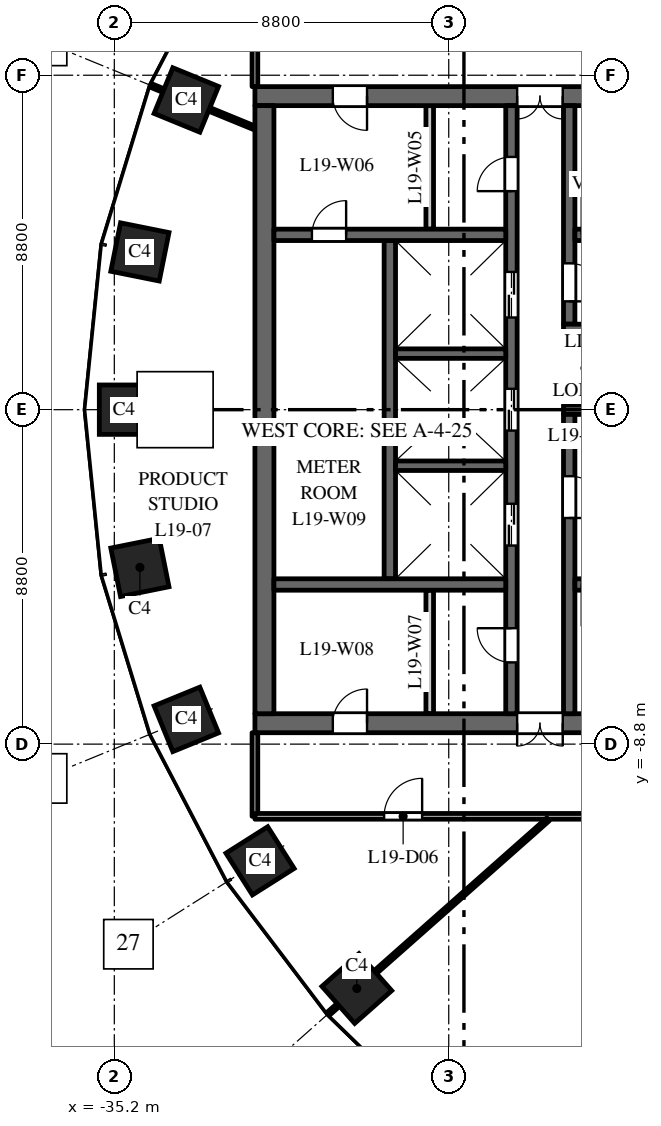
"""IFC4 building model, lengths in metres.
Left out: names, types, materials, properties, quantities, classifications, styles, units other than length and angle.
Written with IfcOpenShell. Run it as: python <this file> out.ifc"""

import sys

from ifc_helpers import new_model, si_unit, direction, frame, frame_2d, origin, origin_2d, place, context, subcontext, project, spatial, rectangle, extrude, element, fill, save


model = new_model("IFC4")
c1 = context("Model", 3, precision=1e-05, world=origin(), true_north=direction((0.0, 1.0)))
c2 = subcontext(c1, "Body", "Model", "MODEL_VIEW")
j1 = project(units=[si_unit("LENGTHUNIT", "METRE"), si_unit("PLANEANGLEUNIT", "RADIAN")], contexts=[c1])
p1 = place(None, origin())
s1 = spatial("IfcSite", under=j1, at=p1, CompositionType="ELEMENT")
p2 = place(p1, origin())
s2 = spatial("IfcBuilding", under=s1, at=p2, CompositionType="ELEMENT")
p3 = place(p2, frame((0.0, 0.0, 88.0)))
s3 = spatial("IfcBuildingStorey", under=s2, at=p3, CompositionType="ELEMENT", Elevation=88.0)
for number, where, z_axis, x_axis in (
    (1, (-33.305, 8.149, 0.0), (0.0, 0.0, 1.0), (-0.379, -0.925, 0.0)),
    (2, (-34.527, 4.151, 0.0), (0.0, 0.0, 1.0), (-0.197, -0.98, 0.0)),
    (3, (-34.945, 0.0, 0.0), (0.0, 0.0, 1.0), (0.0, -1.0, 0.0)),
    (4, (-34.527, -4.151, 0.0), (0.0, 0.0, 1.0), (0.197, -0.98, 0.0)),
    (5, (-33.305, -8.149, 0.0), (0.0, 0.0, 1.0), (0.379, -0.925, 0.0)),
    (6, (-31.365, -11.871, 0.0), (0.0, 0.0, 1.0), (0.535, -0.845, 0.0)),
    (7, (-28.819, -15.23, 0.0), (0.0, 0.0, 1.0), (0.663, -0.749, 0.0)),
):
    element("IfcColumn", number, at=place(p3, frame(where, z_axis=z_axis, x_axis=x_axis)), inside=s3, PredefinedType="COLUMN", context=c2, shape_type="SweptSolid", body=[
        extrude(rectangle(XDim=1.3, YDim=1.3, at=origin_2d()), origin(), (0.0, 0.0, 1.0), 4.0),
    ])
p4 = place(p3, frame((-16.5, 8.25, 0.0), z_axis=(0.0, 0.0, 1.0), x_axis=(-1.0, 0.0, 0.0)))
e8 = element("IfcWall", 8, at=p4, inside=s3, PredefinedType="SHEAR", context=c2, shape_type="SweptSolid", body=[
    extrude(rectangle(XDim=15.0, YDim=0.5, at=frame_2d((7.5, 0.0))), origin(), (0.0, 0.0, 1.0), 3.7),
])
p5 = place(p4, frame((6.9, 0.0, 0.0)))
e9 = element("IfcOpeningElement", 9, at=p5, cuts=e8, PredefinedType="OPENING", context=c2, shape_type="SweptSolid", body=[
    extrude(rectangle(XDim=1.2, YDim=2.1, at=frame_2d((0.6, 1.05))), frame((0.0, 0.26, 0.0), z_axis=(0.0, -1.0, 0.0), x_axis=(1.0, 0.0, 0.0)), (0.0, 0.0, 1.0), 0.52),
])
p6 = place(p4, frame((12.05, 0.0, 0.0)))
e10 = element("IfcOpeningElement", 10, at=p6, cuts=e8, PredefinedType="OPENING", context=c2, shape_type="SweptSolid", body=[
    extrude(rectangle(XDim=0.9, YDim=2.1, at=frame_2d((0.45, 1.05))), frame((0.0, 0.26, 0.0), z_axis=(0.0, -1.0, 0.0), x_axis=(1.0, 0.0, 0.0)), (0.0, 0.0, 1.0), 0.52),
])
p7 = place(p3, frame((-16.5, -8.25, 0.0), z_axis=(0.0, 0.0, 1.0), x_axis=(-1.0, 0.0, 0.0)))
e11 = element("IfcWall", 11, at=p7, inside=s3, PredefinedType="SHEAR", context=c2, shape_type="SweptSolid", body=[
    extrude(rectangle(XDim=15.0, YDim=0.5, at=frame_2d((7.5, 0.0))), origin(), (0.0, 0.0, 1.0), 3.7),
])
p8 = place(p7, frame((6.9, 0.0, 0.0)))
e12 = element("IfcOpeningElement", 12, at=p8, cuts=e11, PredefinedType="OPENING", context=c2, shape_type="SweptSolid", body=[
    extrude(rectangle(XDim=1.2, YDim=2.1, at=frame_2d((0.6, 1.05))), frame((0.0, 0.26, 0.0), z_axis=(0.0, -1.0, 0.0), x_axis=(1.0, 0.0, 0.0)), (0.0, 0.0, 1.0), 0.52),
])
p9 = place(p7, frame((12.05, 0.0, 0.0)))
e13 = element("IfcOpeningElement", 13, at=p9, cuts=e11, PredefinedType="OPENING", context=c2, shape_type="SweptSolid", body=[
    extrude(rectangle(XDim=0.9, YDim=2.1, at=frame_2d((0.45, 1.05))), frame((0.0, 0.26, 0.0), z_axis=(0.0, -1.0, 0.0), x_axis=(1.0, 0.0, 0.0)), (0.0, 0.0, 1.0), 0.52),
])
p10 = place(p3, frame((-27.95, -4.45, 0.0), z_axis=(0.0, 0.0, 1.0), x_axis=(0.0, 1.0, 0.0)))
e14 = element("IfcWall", 14, at=p10, inside=s3, PredefinedType="SHEAR", context=c2, shape_type="SweptSolid", body=[
    extrude(rectangle(XDim=8.9, YDim=0.3, at=frame_2d((4.45, 0.0))), origin(), (0.0, 0.0, 1.0), 3.7),
])
p11 = place(p3, frame((-24.75, -8.0, 0.0), z_axis=(0.0, 0.0, 1.0), x_axis=(0.0, 1.0, 0.0)))
e15 = element("IfcWall", 15, at=p11, inside=s3, PredefinedType="SHEAR", context=c2, shape_type="SweptSolid", body=[
    extrude(rectangle(XDim=16.0, YDim=0.3, at=frame_2d((8.0, 0.0))), origin(), (0.0, 0.0, 1.0), 3.7),
])
p12 = place(p11, frame((4.425, 0.0, 0.0)))
e16 = element("IfcOpeningElement", 16, at=p12, cuts=e15, PredefinedType="OPENING", context=c2, shape_type="SweptSolid", body=[
    extrude(rectangle(XDim=1.1, YDim=2.1, at=frame_2d((0.55, 1.05))), frame((0.0, 0.16, 0.0), z_axis=(0.0, -1.0, 0.0), x_axis=(1.0, 0.0, 0.0)), (0.0, 0.0, 1.0), 0.32),
])
p13 = place(p11, frame((7.45, 0.0, 0.0)))
e17 = element("IfcOpeningElement", 17, at=p13, cuts=e15, PredefinedType="OPENING", context=c2, shape_type="SweptSolid", body=[
    extrude(rectangle(XDim=1.1, YDim=2.1, at=frame_2d((0.55, 1.05))), frame((0.0, 0.16, 0.0), z_axis=(0.0, -1.0, 0.0), x_axis=(1.0, 0.0, 0.0)), (0.0, 0.0, 1.0), 0.32),
])
p14 = place(p11, frame((10.425, 0.0, 0.0)))
e18 = element("IfcOpeningElement", 18, at=p14, cuts=e15, PredefinedType="OPENING", context=c2, shape_type="SweptSolid", body=[
    extrude(rectangle(XDim=1.2, YDim=2.1, at=frame_2d((0.6, 1.05))), frame((0.0, 0.16, 0.0), z_axis=(0.0, -1.0, 0.0), x_axis=(1.0, 0.0, 0.0)), (0.0, 0.0, 1.0), 0.32),
])
p15 = place(p11, frame((13.75, 0.0, 0.0)))
e19 = element("IfcOpeningElement", 19, at=p15, cuts=e15, PredefinedType="OPENING", context=c2, shape_type="SweptSolid", body=[
    extrude(rectangle(XDim=0.9, YDim=2.1, at=frame_2d((0.45, 1.05))), frame((0.0, 0.16, 0.0), z_axis=(0.0, -1.0, 0.0), x_axis=(1.0, 0.0, 0.0)), (0.0, 0.0, 1.0), 0.32),
])
p16 = place(p11, frame((1.35, 0.0, 0.0)))
e20 = element("IfcOpeningElement", 20, at=p16, cuts=e15, PredefinedType="OPENING", context=c2, shape_type="SweptSolid", body=[
    extrude(rectangle(XDim=0.9, YDim=2.1, at=frame_2d((0.45, 1.05))), frame((0.0, 0.16, 0.0), z_axis=(0.0, -1.0, 0.0), x_axis=(1.0, 0.0, 0.0)), (0.0, 0.0, 1.0), 0.32),
])
p17 = place(p3, frame((-20.1, 0.0, 0.0), z_axis=(0.0, 0.0, 1.0), x_axis=(-1.0, 0.0, 0.0)))
e21 = element("IfcWall", 21, at=p17, inside=s3, PredefinedType="SHEAR", context=c2, shape_type="SweptSolid", body=[
    extrude(rectangle(XDim=3.28, YDim=0.25, at=frame_2d((1.64, 0.0))), origin(), (0.0, 0.0, 1.0), 3.7),
])
p18 = place(p3, frame((-31.25, -8.0, 0.0), z_axis=(0.0, 0.0, 1.0), x_axis=(0.0, 1.0, 0.0)))
e22 = element("IfcWall", 22, at=p18, inside=s3, PredefinedType="SHEAR", context=c2, shape_type="SweptSolid", body=[
    extrude(rectangle(XDim=16.0, YDim=0.5, at=frame_2d((8.0, 0.0))), origin(), (0.0, 0.0, 1.0), 3.7),
])
p19 = place(p3, frame((-24.9, 4.6, 0.0), z_axis=(0.0, 0.0, 1.0), x_axis=(-1.0, 0.0, 0.0)))
e23 = element("IfcWall", 23, at=p19, inside=s3, PredefinedType="SHEAR", context=c2, shape_type="SweptSolid", body=[
    extrude(rectangle(XDim=6.1, YDim=0.3, at=frame_2d((3.05, 0.0))), origin(), (0.0, 0.0, 1.0), 3.7),
])
p20 = place(p19, frame((4.2, 0.0, 0.0)))
e24 = element("IfcOpeningElement", 24, at=p20, cuts=e23, PredefinedType="OPENING", context=c2, shape_type="SweptSolid", body=[
    extrude(rectangle(XDim=0.9, YDim=2.1, at=frame_2d((0.45, 1.05))), frame((0.0, 0.16, 0.0), z_axis=(0.0, -1.0, 0.0), x_axis=(1.0, 0.0, 0.0)), (0.0, 0.0, 1.0), 0.32),
])
for number, where, z_axis, x_axis in (
    (25, (-26.9, 4.75, 0.0), (0.0, 0.0, 1.0), (0.0, 1.0, 0.0)),
    (26, (-26.9, -8.0, 0.0), (0.0, 0.0, 1.0), (0.0, 1.0, 0.0)),
):
    element("IfcWall", number, at=place(p3, frame(where, z_axis=z_axis, x_axis=x_axis)), inside=s3, PredefinedType="PARTITIONING", context=c2, shape_type="SweptSolid", body=[
        extrude(rectangle(XDim=3.25, YDim=0.2, at=frame_2d((1.625, 0.0))), origin(), (0.0, 0.0, 1.0), 3.7),
    ])
p21 = place(p3, frame((-24.9, -4.6, 0.0), z_axis=(0.0, 0.0, 1.0), x_axis=(-1.0, 0.0, 0.0)))
e27 = element("IfcWall", 27, at=p21, inside=s3, PredefinedType="SHEAR", context=c2, shape_type="SweptSolid", body=[
    extrude(rectangle(XDim=6.1, YDim=0.3, at=frame_2d((3.05, 0.0))), origin(), (0.0, 0.0, 1.0), 3.7),
])
for number, where, z_axis, x_axis in (
    (28, (-24.9, -1.475, 0.0), (0.0, 0.0, 1.0), (-1.0, 0.0, 0.0)),
    (29, (-24.9, 1.475, 0.0), (0.0, 0.0, 1.0), (-1.0, 0.0, 0.0)),
):
    element("IfcWall", number, at=place(p3, frame(where, z_axis=z_axis, x_axis=x_axis)), inside=s3, PredefinedType="SHEAR", context=c2, shape_type="SweptSolid", body=[
        extrude(rectangle(XDim=2.9, YDim=0.25, at=frame_2d((1.45, 0.0))), origin(), (0.0, 0.0, 1.0), 3.7),
    ])
p22 = place(p3, frame((-23.23, 2.25, 0.0), z_axis=(0.0, 0.0, 1.0), x_axis=(0.0, 1.0, 0.0)))
e30 = element("IfcWall", 30, at=p22, inside=s3, PredefinedType="SHEAR", context=c2, shape_type="SweptSolid", body=[
    extrude(rectangle(XDim=5.75, YDim=0.3, at=frame_2d((2.875, 0.0))), origin(), (0.0, 0.0, 1.0), 3.7),
])
p23 = place(p22, frame((0.6, 0.0, 0.0)))
e31 = element("IfcOpeningElement", 31, at=p23, cuts=e30, PredefinedType="OPENING", context=c2, shape_type="SweptSolid", body=[
    extrude(rectangle(XDim=1.0, YDim=2.1, at=frame_2d((0.5, 1.05))), frame((0.0, 0.16, 0.0), z_axis=(0.0, -1.0, 0.0), x_axis=(1.0, 0.0, 0.0)), (0.0, 0.0, 1.0), 0.32),
])
p24 = place(p3, frame((-23.23, -8.0, 0.0), z_axis=(0.0, 0.0, 1.0), x_axis=(0.0, 1.0, 0.0)))
e32 = element("IfcWall", 32, at=p24, inside=s3, PredefinedType="SHEAR", context=c2, shape_type="SweptSolid", body=[
    extrude(rectangle(XDim=7.875, YDim=0.3, at=frame_2d((3.938, 0.0))), origin(), (0.0, 0.0, 1.0), 3.7),
])
p25 = place(p24, frame((5.15, 0.0, 0.0)))
e33 = element("IfcOpeningElement", 33, at=p25, cuts=e32, PredefinedType="OPENING", context=c2, shape_type="SweptSolid", body=[
    extrude(rectangle(XDim=1.1, YDim=2.1, at=frame_2d((0.55, 1.05))), frame((0.0, 0.16, 0.0), z_axis=(0.0, -1.0, 0.0), x_axis=(1.0, 0.0, 0.0)), (0.0, 0.0, 1.0), 0.32),
])
p26 = place(p3, frame((-16.9, 4.6, 0.0), z_axis=(0.0, 0.0, 1.0), x_axis=(-1.0, 0.0, 0.0)))
e34 = element("IfcWall", 34, at=p26, inside=s3, PredefinedType="SHEAR", context=c2, shape_type="SweptSolid", body=[
    extrude(rectangle(XDim=6.18, YDim=0.3, at=frame_2d((3.09, 0.0))), origin(), (0.0, 0.0, 1.0), 3.7),
])
p27 = place(p26, frame((4.9, 0.0, 0.0)))
e35 = element("IfcOpeningElement", 35, at=p27, cuts=e34, PredefinedType="OPENING", context=c2, shape_type="SweptSolid", body=[
    extrude(rectangle(XDim=1.1, YDim=2.1, at=frame_2d((0.55, 1.05))), frame((0.0, 0.16, 0.0), z_axis=(0.0, -1.0, 0.0), x_axis=(1.0, 0.0, 0.0)), (0.0, 0.0, 1.0), 0.32),
])
p28 = place(p3, frame((-16.9, -4.6, 0.0), z_axis=(0.0, 0.0, 1.0), x_axis=(-1.0, 0.0, 0.0)))
e36 = element("IfcWall", 36, at=p28, inside=s3, PredefinedType="SHEAR", context=c2, shape_type="SweptSolid", body=[
    extrude(rectangle(XDim=6.18, YDim=0.3, at=frame_2d((3.09, 0.0))), origin(), (0.0, 0.0, 1.0), 3.7),
])
p29 = place(p28, frame((4.9, 0.0, 0.0)))
e37 = element("IfcOpeningElement", 37, at=p29, cuts=e36, PredefinedType="OPENING", context=c2, shape_type="SweptSolid", body=[
    extrude(rectangle(XDim=1.1, YDim=2.1, at=frame_2d((0.55, 1.05))), frame((0.0, 0.16, 0.0), z_axis=(0.0, -1.0, 0.0), x_axis=(1.0, 0.0, 0.0)), (0.0, 0.0, 1.0), 0.32),
])
p30 = place(p3, frame((-20.85, 2.125, 0.0), z_axis=(0.0, 0.0, 1.0), x_axis=(-1.0, 0.0, 0.0)))
e38 = element("IfcWall", 38, at=p30, inside=s3, PredefinedType="SHEAR", context=c2, shape_type="SweptSolid", body=[
    extrude(rectangle(XDim=2.53, YDim=0.25, at=frame_2d((1.265, 0.0))), origin(), (0.0, 0.0, 1.0), 3.7),
])
p31 = place(p3, frame((-34.234, 8.53, 0.0), z_axis=(0.0, 0.0, 1.0), x_axis=(0.925344112436, -0.379128307542, 0.0)))
e39 = element("IfcWall", 39, at=p31, inside=s3, PredefinedType="PARTITIONING", context=c2, shape_type="SweptSolid", body=[
    extrude(rectangle(XDim=2.954, YDim=0.1, at=frame_2d((1.477, 0.0))), origin(), (0.0, 0.0, 1.0), 2.9),
])
p32 = place(p3, frame((-31.5, -10.7, 0.0), z_axis=(0.0, 0.0, 1.0), x_axis=(0.0, 1.0, 0.0)))
e40 = element("IfcWall", 40, at=p32, inside=s3, PredefinedType="PARTITIONING", context=c2, shape_type="SweptSolid", body=[
    extrude(rectangle(XDim=2.2, YDim=0.15, at=frame_2d((1.1, 0.0))), origin(), (0.0, 0.0, 1.0), 3.7),
])
p33 = place(p3, frame((-31.5, -10.7, 0.0), z_axis=(0.0, 0.0, 1.0), x_axis=(1.0, 0.0, 0.0)))
e41 = element("IfcWall", 41, at=p33, inside=s3, PredefinedType="PARTITIONING", context=c2, shape_type="SweptSolid", body=[
    extrude(rectangle(XDim=15.0, YDim=0.15, at=frame_2d((7.5, 0.0))), origin(), (0.0, 0.0, 1.0), 3.1),
])
p34 = place(p33, frame((3.4, 0.0, 0.0)))
e42 = element("IfcOpeningElement", 42, at=p34, cuts=e41, PredefinedType="OPENING", context=c2, shape_type="SweptSolid", body=[
    extrude(rectangle(XDim=1.0, YDim=2.1, at=frame_2d((0.5, 1.05))), frame((0.0, 0.085, 0.0), z_axis=(0.0, -1.0, 0.0), x_axis=(1.0, 0.0, 0.0)), (0.0, 0.0, 1.0), 0.17),
])
p35 = place(p33, frame((10.948, 0.0, 0.0)))
e43 = element("IfcOpeningElement", 43, at=p35, cuts=e41, PredefinedType="OPENING", context=c2, shape_type="SweptSolid", body=[
    extrude(rectangle(XDim=1.0, YDim=2.1, at=frame_2d((0.5, 1.05))), frame((0.0, 0.085, 0.0), z_axis=(0.0, -1.0, 0.0), x_axis=(1.0, 0.0, 0.0)), (0.0, 0.0, 1.0), 0.17),
])
p36 = place(p3, frame((-31.5, 8.5, 0.0), z_axis=(0.0, 0.0, 1.0), x_axis=(0.0, 1.0, 0.0)))
e44 = element("IfcWall", 44, at=p36, inside=s3, PredefinedType="PARTITIONING", context=c2, shape_type="SweptSolid", body=[
    extrude(rectangle(XDim=2.2, YDim=0.15, at=frame_2d((1.1, 0.0))), origin(), (0.0, 0.0, 1.0), 3.7),
])
p37 = place(p3, frame((-29.569, -15.895, 0.0), z_axis=(0.0, 0.0, 1.0), x_axis=(0.748985701008, 0.662586160198, 0.0)))
e45 = element("IfcWall", 45, at=p37, inside=s3, PredefinedType="PARTITIONING", context=c2, shape_type="SweptSolid", body=[
    extrude(rectangle(XDim=7.723, YDim=0.1, at=frame_2d((3.861, 0.0))), origin(), (0.0, 0.0, 1.0), 2.9),
])
p38 = place(p12, origin())
e46 = element("IfcDoor", 46, at=p38, inside=s3, OperationType="DOUBLE_DOOR_SLIDING", PredefinedType="DOOR", context=c2, shape_type="SweptSolid", body=[
    extrude(rectangle(XDim=1.1, YDim=2.1, at=frame_2d((0.55, 1.05))), frame((0.0, 0.025, 0.0), z_axis=(0.0, -1.0, 0.0), x_axis=(1.0, 0.0, 0.0)), (0.0, 0.0, 1.0), 0.05),
])
fill(e16, e46)
p39 = place(p13, origin())
e47 = element("IfcDoor", 47, at=p39, inside=s3, OperationType="DOUBLE_DOOR_SLIDING", PredefinedType="DOOR", context=c2, shape_type="SweptSolid", body=[
    extrude(rectangle(XDim=1.1, YDim=2.1, at=frame_2d((0.55, 1.05))), frame((0.0, 0.025, 0.0), z_axis=(0.0, -1.0, 0.0), x_axis=(1.0, 0.0, 0.0)), (0.0, 0.0, 1.0), 0.05),
])
fill(e17, e47)
p40 = place(p14, origin())
e48 = element("IfcDoor", 48, at=p40, inside=s3, OperationType="DOUBLE_DOOR_SLIDING", PredefinedType="DOOR", context=c2, shape_type="SweptSolid", body=[
    extrude(rectangle(XDim=1.2, YDim=2.1, at=frame_2d((0.6, 1.05))), frame((0.0, 0.025, 0.0), z_axis=(0.0, -1.0, 0.0), x_axis=(1.0, 0.0, 0.0)), (0.0, 0.0, 1.0), 0.05),
])
fill(e18, e48)
p41 = place(p27, origin())
e49 = element("IfcDoor", 49, at=p41, inside=s3, OperationType="SINGLE_SWING_RIGHT", PredefinedType="DOOR", context=c2, shape_type="SweptSolid", body=[
    extrude(rectangle(XDim=1.1, YDim=2.1, at=frame_2d((0.55, 1.05))), frame((0.0, 0.025, 0.0), z_axis=(0.0, -1.0, 0.0), x_axis=(1.0, 0.0, 0.0)), (0.0, 0.0, 1.0), 0.05),
])
fill(e35, e49)
p42 = place(p29, origin())
e50 = element("IfcDoor", 50, at=p42, inside=s3, OperationType="SINGLE_SWING_LEFT", PredefinedType="DOOR", context=c2, shape_type="SweptSolid", body=[
    extrude(rectangle(XDim=1.1, YDim=2.1, at=frame_2d((0.55, 1.05))), frame((0.0, 0.025, 0.0), z_axis=(0.0, -1.0, 0.0), x_axis=(1.0, 0.0, 0.0)), (0.0, 0.0, 1.0), 0.05),
])
fill(e37, e50)
p43 = place(p25, origin())
e51 = element("IfcDoor", 51, at=p43, inside=s3, OperationType="SINGLE_SWING_LEFT", PredefinedType="DOOR", context=c2, shape_type="SweptSolid", body=[
    extrude(rectangle(XDim=1.1, YDim=2.1, at=frame_2d((0.55, 1.05))), frame((0.0, 0.025, 0.0), z_axis=(0.0, -1.0, 0.0), x_axis=(1.0, 0.0, 0.0)), (0.0, 0.0, 1.0), 0.05),
])
fill(e33, e51)
p44 = place(p23, origin())
e52 = element("IfcDoor", 52, at=p44, inside=s3, OperationType="SINGLE_SWING_LEFT", PredefinedType="DOOR", context=c2, shape_type="SweptSolid", body=[
    extrude(rectangle(XDim=1.0, YDim=2.1, at=frame_2d((0.5, 1.05))), frame((0.0, 0.025, 0.0), z_axis=(0.0, -1.0, 0.0), x_axis=(1.0, 0.0, 0.0)), (0.0, 0.0, 1.0), 0.05),
])
fill(e31, e52)
p45 = place(p5, origin())
e53 = element("IfcDoor", 53, at=p45, inside=s3, OperationType="DOUBLE_DOOR_DOUBLE_SWING", PredefinedType="DOOR", context=c2, shape_type="SweptSolid", body=[
    extrude(rectangle(XDim=1.2, YDim=2.1, at=frame_2d((0.6, 1.05))), frame((0.0, 0.025, 0.0), z_axis=(0.0, -1.0, 0.0), x_axis=(1.0, 0.0, 0.0)), (0.0, 0.0, 1.0), 0.05),
])
fill(e9, e53)
p46 = place(p8, origin())
e54 = element("IfcDoor", 54, at=p46, inside=s3, OperationType="DOUBLE_DOOR_DOUBLE_SWING", PredefinedType="DOOR", context=c2, shape_type="SweptSolid", body=[
    extrude(rectangle(XDim=1.2, YDim=2.1, at=frame_2d((0.6, 1.05))), frame((0.0, 0.025, 0.0), z_axis=(0.0, -1.0, 0.0), x_axis=(1.0, 0.0, 0.0)), (0.0, 0.0, 1.0), 0.05),
])
fill(e12, e54)
p47 = place(p15, origin())
e55 = element("IfcDoor", 55, at=p47, inside=s3, OperationType="SINGLE_SWING_RIGHT", PredefinedType="DOOR", context=c2, shape_type="SweptSolid", body=[
    extrude(rectangle(XDim=0.9, YDim=2.1, at=frame_2d((0.45, 1.05))), frame((0.0, 0.025, 0.0), z_axis=(0.0, -1.0, 0.0), x_axis=(1.0, 0.0, 0.0)), (0.0, 0.0, 1.0), 0.05),
])
fill(e19, e55)
p48 = place(p6, origin())
e56 = element("IfcDoor", 56, at=p48, inside=s3, OperationType="SINGLE_SWING_RIGHT", PredefinedType="DOOR", context=c2, shape_type="SweptSolid", body=[
    extrude(rectangle(XDim=0.9, YDim=2.1, at=frame_2d((0.45, 1.05))), frame((0.0, 0.025, 0.0), z_axis=(0.0, -1.0, 0.0), x_axis=(1.0, 0.0, 0.0)), (0.0, 0.0, 1.0), 0.05),
])
fill(e10, e56)
p49 = place(p16, origin())
e57 = element("IfcDoor", 57, at=p49, inside=s3, OperationType="SINGLE_SWING_LEFT", PredefinedType="DOOR", context=c2, shape_type="SweptSolid", body=[
    extrude(rectangle(XDim=0.9, YDim=2.1, at=frame_2d((0.45, 1.05))), frame((0.0, 0.025, 0.0), z_axis=(0.0, -1.0, 0.0), x_axis=(1.0, 0.0, 0.0)), (0.0, 0.0, 1.0), 0.05),
])
fill(e20, e57)
p50 = place(p9, origin())
e58 = element("IfcDoor", 58, at=p50, inside=s3, OperationType="SINGLE_SWING_LEFT", PredefinedType="DOOR", context=c2, shape_type="SweptSolid", body=[
    extrude(rectangle(XDim=0.9, YDim=2.1, at=frame_2d((0.45, 1.05))), frame((0.0, 0.025, 0.0), z_axis=(0.0, -1.0, 0.0), x_axis=(1.0, 0.0, 0.0)), (0.0, 0.0, 1.0), 0.05),
])
fill(e13, e58)
p51 = place(p20, origin())
e59 = element("IfcDoor", 59, at=p51, inside=s3, OperationType="SINGLE_SWING_LEFT", PredefinedType="DOOR", context=c2, shape_type="SweptSolid", body=[
    extrude(rectangle(XDim=0.9, YDim=2.1, at=frame_2d((0.45, 1.05))), frame((0.0, 0.025, 0.0), z_axis=(0.0, -1.0, 0.0), x_axis=(1.0, 0.0, 0.0)), (0.0, 0.0, 1.0), 0.05),
])
fill(e24, e59)
p52 = place(p34, origin())
e60 = element("IfcDoor", 60, at=p52, inside=s3, OperationType="SINGLE_SWING_RIGHT", PredefinedType="DOOR", context=c2, shape_type="SweptSolid", body=[
    extrude(rectangle(XDim=1.0, YDim=2.1, at=frame_2d((0.5, 1.05))), frame((0.0, 0.025, 0.0), z_axis=(0.0, -1.0, 0.0), x_axis=(1.0, 0.0, 0.0)), (0.0, 0.0, 1.0), 0.05),
])
fill(e42, e60)
save(model, sys.argv[1])
